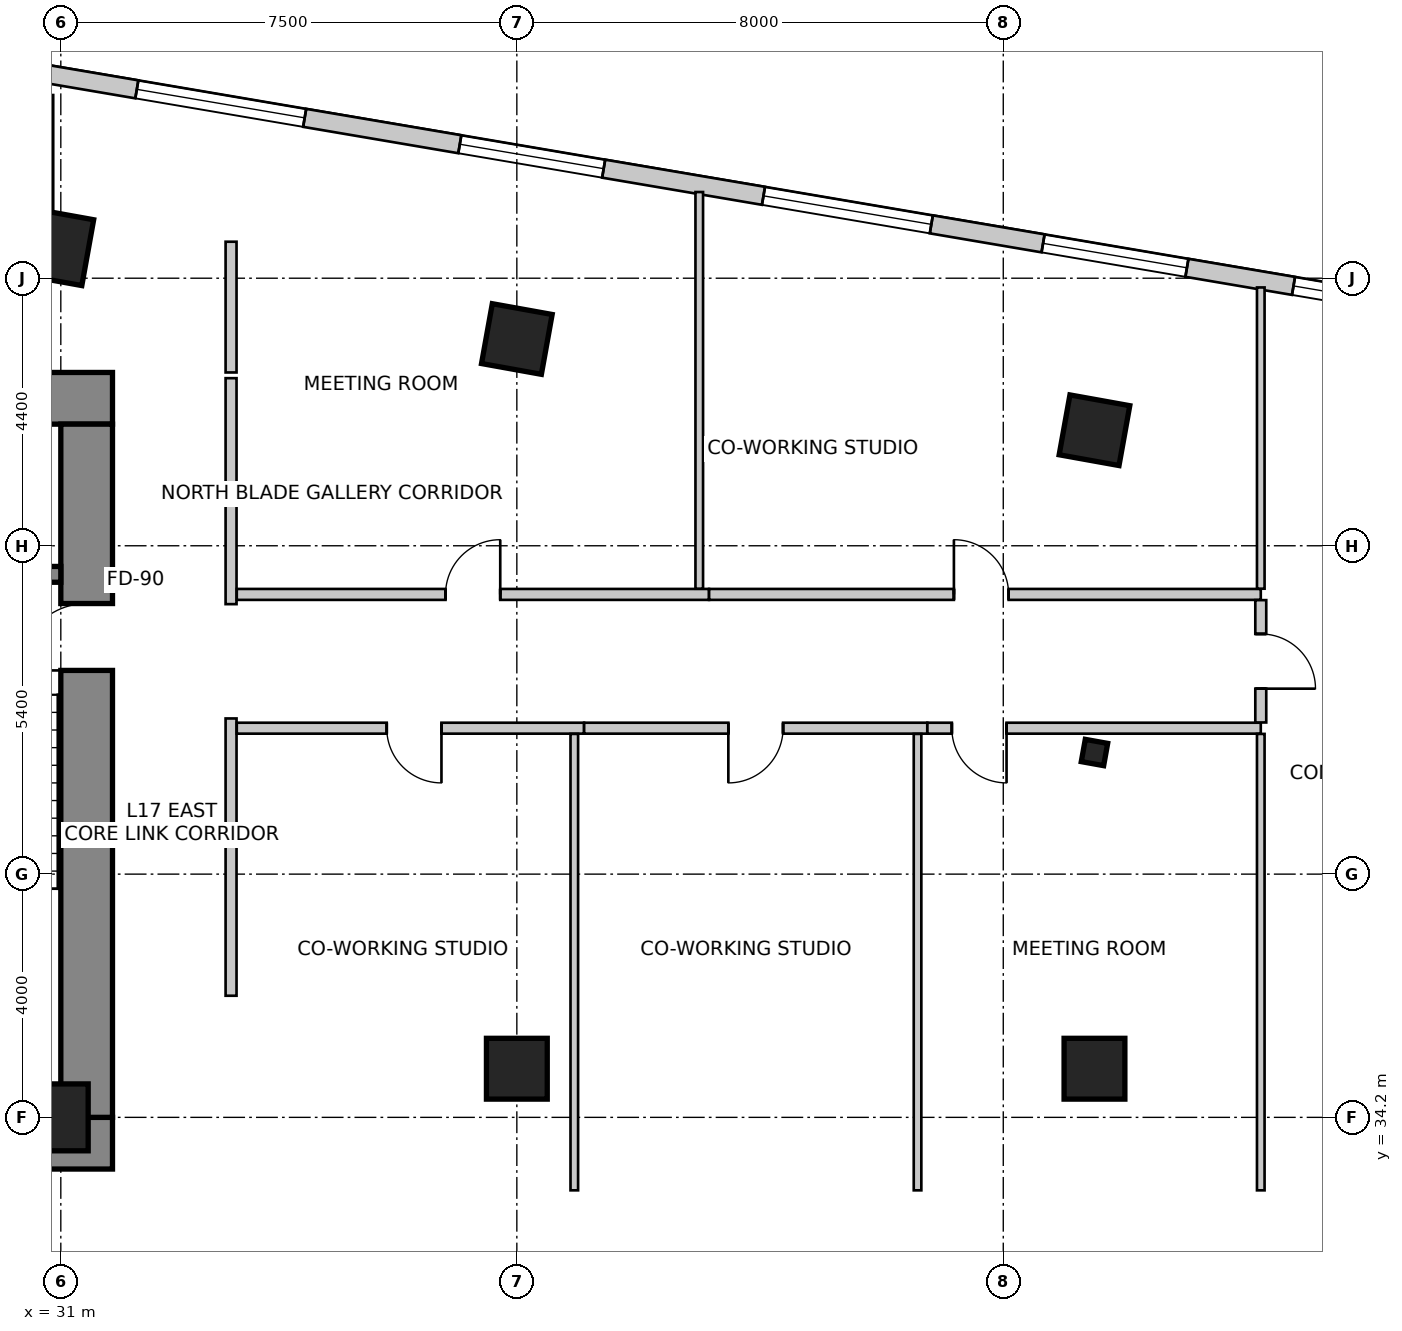
"""IFC4 building model, lengths in metres.
Left out: names, types, materials, properties, quantities, classifications, styles, units other than length and angle.
Written with IfcOpenShell. Run it as: python <this file> out.ifc"""

import sys

from ifc_helpers import new_model, si_unit, direction, frame, frame_2d, origin, origin_2d, place, context, subcontext, project, spatial, rectangle, i_section, extrude, source, transform, mapped, element, fill, save


model = new_model("IFC4")
c1 = context("Model", 3, precision=1e-05, world=origin(), true_north=direction((0.0, 1.0)))
c2 = subcontext(c1, "Body", "Model", "MODEL_VIEW")
j1 = project(units=[si_unit("LENGTHUNIT", "METRE"), si_unit("PLANEANGLEUNIT", "RADIAN")], contexts=[c1])
p1 = place(None, origin())
s1 = spatial("IfcSite", under=j1, at=p1, CompositionType="ELEMENT")
p2 = place(p1, origin())
s2 = spatial("IfcBuilding", under=s1, at=p2, CompositionType="ELEMENT")
p3 = place(p2, frame((0.0, 0.0, 71.0)))
s3 = spatial("IfcBuildingStorey", under=s2, at=p3, CompositionType="ELEMENT", Elevation=71.0)
p4 = place(p3, frame((15.75, 46.025, 0.0), z_axis=(0.0, 0.0, 1.0), x_axis=(1.0, 0.0, 0.0)))
e1 = element("IfcWall", 1, at=p4, inside=s3, PredefinedType="SHEAR", context=c2, shape_type="SweptSolid", body=[
    extrude(rectangle(XDim=16.1, YDim=0.85, at=frame_2d((8.05, 0.0))), origin(), (0.0, 0.0, 1.0), 4.0),
])
p5 = place(p3, frame((15.75, 33.775, 0.0), z_axis=(0.0, 0.0, 1.0), x_axis=(1.0, 0.0, 0.0)))
e2 = element("IfcWall", 2, at=p5, inside=s3, PredefinedType="SHEAR", context=c2, shape_type="SweptSolid", body=[
    extrude(rectangle(XDim=16.1, YDim=0.85, at=frame_2d((8.05, 0.0))), origin(), (0.0, 0.0, 1.0), 4.0),
])
m1 = source(origin(), c2, "Body", "SweptSolid", [
    extrude(rectangle(XDim=1.3, YDim=2.15, at=frame_2d((0.65, 1.075))), frame((0.0, 0.435, 0.0), z_axis=(0.0, -1.0, 0.0), x_axis=(1.0, 0.0, 0.0)), (0.0, 0.0, 1.0), 0.87),
])
p6 = place(p5, frame((10.18, 0.0, 0.0)))
e3 = element("IfcOpeningElement", 3, at=p6, cuts=e2, PredefinedType="OPENING", context=c2, shape_type="MappedRepresentation", body=[
    mapped(m1, transform((0.0, 0.0, 0.0), scale=1.0)),
])
p7 = place(p3, frame((31.425, 34.2, 0.0), z_axis=(0.0, 0.0, 1.0), x_axis=(0.0, 1.0, 0.0)))
e4 = element("IfcWall", 4, at=p7, inside=s3, PredefinedType="SHEAR", context=c2, shape_type="SweptSolid", body=[
    extrude(rectangle(XDim=11.4, YDim=0.85, at=frame_2d((5.7, 0.0))), origin(), (0.0, 0.0, 1.0), 4.0),
])
m2 = source(origin(), c2, "Body", "SweptSolid", [
    extrude(rectangle(XDim=1.1, YDim=2.15, at=frame_2d((0.55, 1.075))), frame((0.0, 0.435, 0.0), z_axis=(0.0, -1.0, 0.0), x_axis=(1.0, 0.0, 0.0)), (0.0, 0.0, 1.0), 0.87),
])
p8 = place(p7, frame((7.35, 0.0, 0.0)))
e5 = element("IfcOpeningElement", 5, at=p8, cuts=e4, PredefinedType="OPENING", context=c2, shape_type="MappedRepresentation", body=[
    mapped(m2, transform((0.0, 0.0, 0.0), scale=1.0)),
])
p9 = place(p3, frame((27.5, 43.13, 0.0), z_axis=(0.0, 0.0, 1.0), x_axis=(1.0, 0.0, 0.0)))
e6 = element("IfcWall", 6, at=p9, inside=s3, PredefinedType="SHEAR", context=c2, shape_type="SweptSolid", body=[
    extrude(rectangle(XDim=3.5, YDim=0.26, at=frame_2d((1.75, 0.0))), origin(), (0.0, 0.0, 1.0), 4.0),
])
m3 = source(origin(), c2, "Body", "SweptSolid", [
    extrude(rectangle(XDim=0.9, YDim=1.1, at=origin_2d()), origin(), (0.0, 0.0, 1.0), 4.0),
])
p10 = place(p3, frame((31.0, 48.5, 0.0), z_axis=(0.0, 0.0, 1.0), x_axis=(0.984195607969, -0.17708474032, 0.0)))
e7 = element("IfcColumn", 7, at=p10, inside=s3, PredefinedType="COLUMN", context=c2, shape_type="MappedRepresentation", body=[
    mapped(m3, transform((0.0, 0.0, 0.0), scale=1.0)),
])
m4 = source(origin(), c2, "Body", "SweptSolid", [
    extrude(rectangle(XDim=1.0, YDim=1.0, at=origin_2d()), origin(), (0.0, 0.0, 1.0), 4.0),
])
for number, where, z_axis, x_axis in (
    (8, (38.5, 47.0, 0.0), (0.0, 0.0, 1.0), (0.984, -0.177, 0.0)),
    (9, (48.0, 45.5, 0.0), (0.0, 0.0, 1.0), (0.984, -0.177, 0.0)),
):
    element("IfcColumn", number, at=place(p3, frame(where, z_axis=z_axis, x_axis=x_axis)), inside=s3, PredefinedType="COLUMN", context=c2, shape_type="MappedRepresentation", body=[
        mapped(m4, transform((0.0, 0.0, 0.0), scale=1.0)),
    ])
p11 = place(p3, frame((31.0, 34.2, 0.0), z_axis=(0.0, 0.0, 1.0), x_axis=(1.0, 0.0, 0.0)))
e10 = element("IfcColumn", 10, at=p11, inside=s3, PredefinedType="COLUMN", context=c2, shape_type="MappedRepresentation", body=[
    mapped(m3, transform((0.0, 0.0, 0.0), scale=1.0)),
])
for number, where, z_axis, x_axis in (
    (11, (38.5, 35.0, 0.0), (0.0, 0.0, 1.0), (1.0, 0.0, 0.0)),
    (12, (48.0, 35.0, 0.0), (0.0, 0.0, 1.0), (1.0, 0.0, 0.0)),
):
    element("IfcColumn", number, at=place(p3, frame(where, z_axis=z_axis, x_axis=x_axis)), inside=s3, PredefinedType="COLUMN", context=c2, shape_type="MappedRepresentation", body=[
        mapped(m4, transform((0.0, 0.0, 0.0), scale=1.0)),
    ])
m5 = source(origin(), c2, "Body", "SweptSolid", [
    extrude(i_section(OverallWidth=0.374, OverallDepth=0.372, WebThickness=0.016, FlangeThickness=0.026, FilletRadius=0.015, at=origin_2d()), origin(), (0.0, 0.0, 1.0), 4.0),
])
p12 = place(p3, frame((48.0, 40.2, 0.0), z_axis=(0.0, 0.0, 1.0), x_axis=(0.984195607969, -0.17708474032, 0.0)))
e13 = element("IfcColumn", 13, at=p12, inside=s3, PredefinedType="COLUMN", context=c2, shape_type="MappedRepresentation", body=[
    mapped(m5, transform((0.0, 0.0, 0.0), scale=1.0)),
])
p13 = place(p3, frame((53.961, 47.417, 0.0), z_axis=(0.0, 0.0, 1.0), x_axis=(-0.985865713455, 0.167537443678, 0.0)))
e14 = element("IfcWall", 14, at=p13, inside=s3, PredefinedType="SOLIDWALL", context=c2, shape_type="SweptSolid", body=[
    extrude(rectangle(XDim=32.537, YDim=0.3, at=frame_2d((16.269, 0.0))), origin(), (0.0, 0.0, 1.0), 3.75),
])
m6 = source(origin(), c2, "Body", "SweptSolid", [
    extrude(rectangle(XDim=2.1, YDim=2.0, at=frame_2d((1.05, 1.0))), frame((0.0, 0.16, 0.0), z_axis=(0.0, -1.0, 0.0), x_axis=(1.0, 0.0, 0.0)), (0.0, 0.0, 1.0), 0.32),
])
p14 = place(p13, frame((0.626, 0.0, 0.85)))
e15 = element("IfcOpeningElement", 15, at=p14, cuts=e14, PredefinedType="OPENING", context=c2, shape_type="MappedRepresentation", body=[
    mapped(m6, transform((0.0, 0.0, 0.0), scale=1.0)),
])
m7 = source(origin(), c2, "Body", "SweptSolid", [
    extrude(rectangle(XDim=2.4, YDim=2.2, at=frame_2d((1.2, 1.1))), frame((0.0, 0.16, 0.0), z_axis=(0.0, -1.0, 0.0), x_axis=(1.0, 0.0, 0.0)), (0.0, 0.0, 1.0), 0.32),
])
p15 = place(p13, frame((4.504, 0.0, 0.85)))
e16 = element("IfcOpeningElement", 16, at=p15, cuts=e14, PredefinedType="OPENING", context=c2, shape_type="MappedRepresentation", body=[
    mapped(m7, transform((0.0, 0.0, 0.0), scale=1.0)),
])
m8 = source(origin(), c2, "Body", "SweptSolid", [
    extrude(rectangle(XDim=2.8, YDim=2.4, at=frame_2d((1.4, 1.2))), frame((0.0, 0.16, 0.0), z_axis=(0.0, -1.0, 0.0), x_axis=(1.0, 0.0, 0.0)), (0.0, 0.0, 1.0), 0.32),
])
p16 = place(p13, frame((8.768, 0.0, 0.85)))
e17 = element("IfcOpeningElement", 17, at=p16, cuts=e14, PredefinedType="OPENING", context=c2, shape_type="MappedRepresentation", body=[
    mapped(m8, transform((0.0, 0.0, 0.0), scale=1.0)),
])
p17 = place(p13, frame((14.234, 0.0, 0.85)))
e18 = element("IfcOpeningElement", 18, at=p17, cuts=e14, PredefinedType="OPENING", context=c2, shape_type="MappedRepresentation", body=[
    mapped(m7, transform((0.0, 0.0, 0.0), scale=1.0)),
])
p18 = place(p13, frame((19.222, 0.0, 0.85)))
e19 = element("IfcOpeningElement", 19, at=p18, cuts=e14, PredefinedType="OPENING", context=c2, shape_type="MappedRepresentation", body=[
    mapped(m8, transform((0.0, 0.0, 0.0), scale=1.0)),
])
p19 = place(p13, frame((25.095, 0.0, 0.85)))
e20 = element("IfcOpeningElement", 20, at=p19, cuts=e14, PredefinedType="OPENING", context=c2, shape_type="MappedRepresentation", body=[
    mapped(m7, transform((0.0, 0.0, 0.0), scale=1.0)),
])
p20 = place(p13, frame((29.595, 0.0, 0.85)))
e21 = element("IfcOpeningElement", 21, at=p20, cuts=e14, PredefinedType="OPENING", context=c2, shape_type="MappedRepresentation", body=[
    mapped(m7, transform((0.0, 0.0, 0.0), scale=1.0)),
])
p21 = place(p3, frame((25.362, 48.6, 0.0), z_axis=(0.0, 0.0, 1.0), x_axis=(1.0, 0.0, 0.0)))
e22 = element("IfcWall", 22, at=p21, inside=s3, PredefinedType="PARTITIONING", context=c2, shape_type="SweptSolid", body=[
    extrude(rectangle(XDim=5.598, YDim=0.18, at=frame_2d((2.799, 0.0))), origin(), (0.0, 0.0, 1.0), 2.892),
])
m9 = source(origin(), c2, "Body", "SweptSolid", [
    extrude(rectangle(XDim=0.9, YDim=2.15, at=frame_2d((0.45, 1.075))), frame((0.0, 0.1, 0.0), z_axis=(0.0, -1.0, 0.0), x_axis=(1.0, 0.0, 0.0)), (0.0, 0.0, 1.0), 0.2),
])
p22 = place(p21, frame((2.349, 0.0, 0.0)))
e23 = element("IfcOpeningElement", 23, at=p22, cuts=e22, PredefinedType="OPENING", context=c2, shape_type="MappedRepresentation", body=[
    mapped(m9, transform((0.0, 0.0, 0.0), scale=1.0)),
])
p23 = place(p3, frame((33.8, 48.6, 0.0), z_axis=(0.0, 0.0, 1.0), x_axis=(0.0, -1.0, 0.0)))
e24 = element("IfcWall", 24, at=p23, inside=s3, PredefinedType="PARTITIONING", context=c2, shape_type="SweptSolid", body=[
    extrude(rectangle(XDim=2.15, YDim=0.18, at=frame_2d((1.075, 0.0))), origin(), (0.0, 0.0, 1.0), 2.892),
])
p24 = place(p3, frame((33.8, 40.76, 0.0), z_axis=(0.0, 0.0, 1.0), x_axis=(0.0, -1.0, 0.0)))
e25 = element("IfcWall", 25, at=p24, inside=s3, PredefinedType="PARTITIONING", context=c2, shape_type="SweptSolid", body=[
    extrude(rectangle(XDim=4.56, YDim=0.18, at=frame_2d((2.28, 0.0))), origin(), (0.0, 0.0, 1.0), 3.75),
])
p25 = place(p3, frame((33.8, 46.356, 0.0), z_axis=(0.0, 0.0, 1.0), x_axis=(0.0, -1.0, 0.0)))
e26 = element("IfcWall", 26, at=p25, inside=s3, PredefinedType="PARTITIONING", context=c2, shape_type="SweptSolid", body=[
    extrude(rectangle(XDim=3.716, YDim=0.18, at=frame_2d((1.858, 0.0))), origin(), (0.0, 0.0, 1.0), 3.322),
])
p26 = place(p3, frame((39.605, 40.6, 0.0), z_axis=(0.0, 0.0, 1.0), x_axis=(-1.0, 0.0, 0.0)))
e27 = element("IfcWall", 27, at=p26, inside=s3, PredefinedType="PARTITIONING", context=c2, shape_type="SweptSolid", body=[
    extrude(rectangle(XDim=5.711, YDim=0.18, at=frame_2d((2.855, 0.0))), origin(), (0.0, 0.0, 1.0), 3.125),
])
p27 = place(p26, frame((2.345, 0.0, 0.0)))
e28 = element("IfcOpeningElement", 28, at=p27, cuts=e27, PredefinedType="OPENING", context=c2, shape_type="MappedRepresentation", body=[
    mapped(m9, transform((0.0, 0.0, 0.0), scale=1.0)),
])
p28 = place(p3, frame((45.25, 40.6, 0.0), z_axis=(0.0, 0.0, 1.0), x_axis=(-1.0, 0.0, 0.0)))
e29 = element("IfcWall", 29, at=p28, inside=s3, PredefinedType="PARTITIONING", context=c2, shape_type="SweptSolid", body=[
    extrude(rectangle(XDim=5.643, YDim=0.18, at=frame_2d((2.822, 0.0))), origin(), (0.0, 0.0, 1.0), 3.322),
])
p29 = place(p28, frame((2.372, 0.0, 0.0)))
e30 = element("IfcOpeningElement", 30, at=p29, cuts=e29, PredefinedType="OPENING", context=c2, shape_type="MappedRepresentation", body=[
    mapped(m9, transform((0.0, 0.0, 0.0), scale=1.0)),
])
p30 = place(p3, frame((50.735, 40.6, 0.0), z_axis=(0.0, 0.0, 1.0), x_axis=(-1.0, 0.0, 0.0)))
e31 = element("IfcWall", 31, at=p30, inside=s3, PredefinedType="PARTITIONING", context=c2, shape_type="SweptSolid", body=[
    extrude(rectangle(XDim=5.483, YDim=0.18, at=frame_2d((2.742, 0.0))), origin(), (0.0, 0.0, 1.0), 3.125),
])
p31 = place(p30, frame((4.181, 0.0, 0.0)))
e32 = element("IfcOpeningElement", 32, at=p31, cuts=e31, PredefinedType="OPENING", context=c2, shape_type="MappedRepresentation", body=[
    mapped(m9, transform((0.0, 0.0, 0.0), scale=1.0)),
])
p32 = place(p3, frame((33.894, 42.8, 0.0), z_axis=(0.0, 0.0, 1.0), x_axis=(1.0, 0.0, 0.0)))
e33 = element("IfcWall", 33, at=p32, inside=s3, PredefinedType="PARTITIONING", context=c2, shape_type="SweptSolid", body=[
    extrude(rectangle(XDim=7.766, YDim=0.18, at=frame_2d((3.883, 0.0))), origin(), (0.0, 0.0, 1.0), 3.125),
])
p33 = place(p32, frame((3.433, 0.0, 0.0)))
e34 = element("IfcOpeningElement", 34, at=p33, cuts=e33, PredefinedType="OPENING", context=c2, shape_type="MappedRepresentation", body=[
    mapped(m9, transform((0.0, 0.0, 0.0), scale=1.0)),
])
p34 = place(p3, frame((41.662, 42.8, 0.0), z_axis=(0.0, 0.0, 1.0), x_axis=(1.0, 0.0, 0.0)))
e35 = element("IfcWall", 35, at=p34, inside=s3, PredefinedType="PARTITIONING", context=c2, shape_type="SweptSolid", body=[
    extrude(rectangle(XDim=9.073, YDim=0.18, at=frame_2d((4.537, 0.0))), origin(), (0.0, 0.0, 1.0), 3.125),
])
p35 = place(p34, frame((4.026, 0.0, 0.0)))
e36 = element("IfcOpeningElement", 36, at=p35, cuts=e35, PredefinedType="OPENING", context=c2, shape_type="MappedRepresentation", body=[
    mapped(m9, transform((0.0, 0.0, 0.0), scale=1.0)),
])
p36 = place(p3, frame((50.735, 42.706, 0.0), z_axis=(0.0, 0.0, 1.0), x_axis=(0.0, -1.0, 0.0)))
e37 = element("IfcWall", 37, at=p36, inside=s3, PredefinedType="PARTITIONING", context=c2, shape_type="SweptSolid", body=[
    extrude(rectangle(XDim=2.012, YDim=0.18, at=frame_2d((1.006, 0.0))), origin(), (0.0, 0.0, 1.0), 3.75),
])
p37 = place(p36, frame((0.556, 0.0, 0.0)))
e38 = element("IfcOpeningElement", 38, at=p37, cuts=e37, PredefinedType="OPENING", context=c2, shape_type="MappedRepresentation", body=[
    mapped(m9, transform((0.0, 0.0, 0.0), scale=1.0)),
])
for number, where, z_axis, x_axis in (
    (39, (39.445, 40.506, 0.0), (0.0, 0.0, 1.0), (0.0, -1.0, 0.0)),
    (40, (45.09, 40.506, 0.0), (0.0, 0.0, 1.0), (0.0, -1.0, 0.0)),
):
    element("IfcWall", number, at=place(p3, frame(where, z_axis=z_axis, x_axis=x_axis)), inside=s3, PredefinedType="PARTITIONING", context=c2, shape_type="SweptSolid", body=[
        extrude(rectangle(XDim=7.506, YDim=0.125, at=frame_2d((3.753, 0.0))), origin(), (0.0, 0.0, 1.0), 2.892),
    ])
p38 = place(p3, frame((50.735, 40.506, 0.0), z_axis=(0.0, 0.0, 1.0), x_axis=(0.0, -1.0, 0.0)))
e41 = element("IfcWall", 41, at=p38, inside=s3, PredefinedType="PARTITIONING", context=c2, shape_type="SweptSolid", body=[
    extrude(rectangle(XDim=7.506, YDim=0.125, at=frame_2d((3.753, 0.0))), origin(), (0.0, 0.0, 1.0), 3.75),
])
p39 = place(p3, frame((41.5, 49.417, 0.0), z_axis=(0.0, 0.0, 1.0), x_axis=(0.0, -1.0, 0.0)))
e42 = element("IfcWall", 42, at=p39, inside=s3, PredefinedType="PARTITIONING", context=c2, shape_type="SweptSolid", body=[
    extrude(rectangle(XDim=6.523, YDim=0.125, at=frame_2d((3.262, 0.0))), origin(), (0.0, 0.0, 1.0), 2.892),
])
p40 = place(p3, frame((50.735, 47.848, 0.0), z_axis=(0.0, 0.0, 1.0), x_axis=(0.0, -1.0, 0.0)))
e43 = element("IfcWall", 43, at=p40, inside=s3, PredefinedType="PARTITIONING", context=c2, shape_type="SweptSolid", body=[
    extrude(rectangle(XDim=4.954, YDim=0.125, at=frame_2d((2.477, 0.0))), origin(), (0.0, 0.0, 1.0), 3.75),
])
p41 = place(p3, frame((30.8, 51.013, 0.0), z_axis=(0.0, 0.0, 1.0), x_axis=(0.0, -1.0, 0.0)))
e44 = element("IfcWall", 44, at=p41, inside=s3, PredefinedType="PARTITIONING", context=c2, shape_type="SweptSolid", body=[
    extrude(rectangle(XDim=2.193, YDim=0.15, at=frame_2d((1.096, 0.0))), origin(), (0.0, 0.0, 1.0), 3.75),
])
m10 = source(origin(), c2, "Body", "SweptSolid", [
    extrude(rectangle(XDim=2.1, YDim=2.0, at=frame_2d((1.05, 1.0))), frame((0.0, -0.015, 0.0), z_axis=(0.0, -1.0, 0.0), x_axis=(1.0, 0.0, 0.0)), (0.0, 0.0, 1.0), 0.06),
])
p42 = place(p14, origin())
e45 = element("IfcWindow", 45, at=p42, inside=s3, PartitioningType="SINGLE_PANEL", PredefinedType="WINDOW", context=c2, shape_type="MappedRepresentation", body=[
    mapped(m10, transform((0.0, 0.0, 0.0), scale=1.0)),
])
fill(e15, e45)
m11 = source(origin(), c2, "Body", "SweptSolid", [
    extrude(rectangle(XDim=2.4, YDim=2.2, at=frame_2d((1.2, 1.1))), frame((0.0, -0.015, 0.0), z_axis=(0.0, -1.0, 0.0), x_axis=(1.0, 0.0, 0.0)), (0.0, 0.0, 1.0), 0.06),
])
p43 = place(p15, origin())
e46 = element("IfcWindow", 46, at=p43, inside=s3, PartitioningType="SINGLE_PANEL", PredefinedType="WINDOW", context=c2, shape_type="MappedRepresentation", body=[
    mapped(m11, transform((0.0, 0.0, 0.0), scale=1.0)),
])
fill(e16, e46)
m12 = source(origin(), c2, "Body", "SweptSolid", [
    extrude(rectangle(XDim=2.8, YDim=2.4, at=frame_2d((1.4, 1.2))), frame((0.0, -0.015, 0.0), z_axis=(0.0, -1.0, 0.0), x_axis=(1.0, 0.0, 0.0)), (0.0, 0.0, 1.0), 0.06),
])
p44 = place(p16, origin())
e47 = element("IfcWindow", 47, at=p44, inside=s3, PartitioningType="SINGLE_PANEL", PredefinedType="WINDOW", context=c2, shape_type="MappedRepresentation", body=[
    mapped(m12, transform((0.0, 0.0, 0.0), scale=1.0)),
])
fill(e17, e47)
p45 = place(p17, origin())
e48 = element("IfcWindow", 48, at=p45, inside=s3, PartitioningType="SINGLE_PANEL", PredefinedType="WINDOW", context=c2, shape_type="MappedRepresentation", body=[
    mapped(m11, transform((0.0, 0.0, 0.0), scale=1.0)),
])
fill(e18, e48)
p46 = place(p18, origin())
e49 = element("IfcWindow", 49, at=p46, inside=s3, PartitioningType="SINGLE_PANEL", PredefinedType="WINDOW", context=c2, shape_type="MappedRepresentation", body=[
    mapped(m12, transform((0.0, 0.0, 0.0), scale=1.0)),
])
fill(e19, e49)
m13 = source(origin(), c2, "Body", "SweptSolid", [
    extrude(rectangle(XDim=1.1, YDim=2.15, at=frame_2d((0.55, 1.075))), frame((0.0, 0.025, 0.0), z_axis=(0.0, -1.0, 0.0), x_axis=(1.0, 0.0, 0.0)), (0.0, 0.0, 1.0), 0.05),
])
p47 = place(p8, origin())
e50 = element("IfcDoor", 50, at=p47, inside=s3, OperationType="SINGLE_SWING_LEFT", PredefinedType="DOOR", context=c2, shape_type="MappedRepresentation", body=[
    mapped(m13, transform((0.0, 0.0, 0.0), scale=1.0)),
])
fill(e5, e50)
m14 = source(origin(), c2, "Body", "SweptSolid", [
    extrude(rectangle(XDim=0.9, YDim=2.15, at=frame_2d((0.45, 1.075))), frame((0.0, 0.025, 0.0), z_axis=(0.0, -1.0, 0.0), x_axis=(1.0, 0.0, 0.0)), (0.0, 0.0, 1.0), 0.05),
])
p48 = place(p27, origin())
e51 = element("IfcDoor", 51, at=p48, inside=s3, OperationType="SINGLE_SWING_LEFT", PredefinedType="DOOR", context=c2, shape_type="MappedRepresentation", body=[
    mapped(m14, transform((0.0, 0.0, 0.0), scale=1.0)),
])
fill(e28, e51)
p49 = place(p29, origin())
e52 = element("IfcDoor", 52, at=p49, inside=s3, OperationType="SINGLE_SWING_RIGHT", PredefinedType="DOOR", context=c2, shape_type="MappedRepresentation", body=[
    mapped(m14, transform((0.0, 0.0, 0.0), scale=1.0)),
])
fill(e30, e52)
p50 = place(p31, origin())
e53 = element("IfcDoor", 53, at=p50, inside=s3, OperationType="SINGLE_SWING_LEFT", PredefinedType="DOOR", context=c2, shape_type="MappedRepresentation", body=[
    mapped(m14, transform((0.0, 0.0, 0.0), scale=1.0)),
])
fill(e32, e53)
p51 = place(p33, origin())
e54 = element("IfcDoor", 54, at=p51, inside=s3, OperationType="SINGLE_SWING_RIGHT", PredefinedType="DOOR", context=c2, shape_type="MappedRepresentation", body=[
    mapped(m14, transform((0.0, 0.0, 0.0), scale=1.0)),
])
fill(e34, e54)
p52 = place(p35, origin())
e55 = element("IfcDoor", 55, at=p52, inside=s3, OperationType="SINGLE_SWING_LEFT", PredefinedType="DOOR", context=c2, shape_type="MappedRepresentation", body=[
    mapped(m14, transform((0.0, 0.0, 0.0), scale=1.0)),
])
fill(e36, e55)
p53 = place(p37, origin())
e56 = element("IfcDoor", 56, at=p53, inside=s3, OperationType="SINGLE_SWING_RIGHT", PredefinedType="DOOR", context=c2, shape_type="MappedRepresentation", body=[
    mapped(m14, transform((0.0, 0.0, 0.0), scale=1.0)),
])
fill(e38, e56)
save(model, sys.argv[1])
